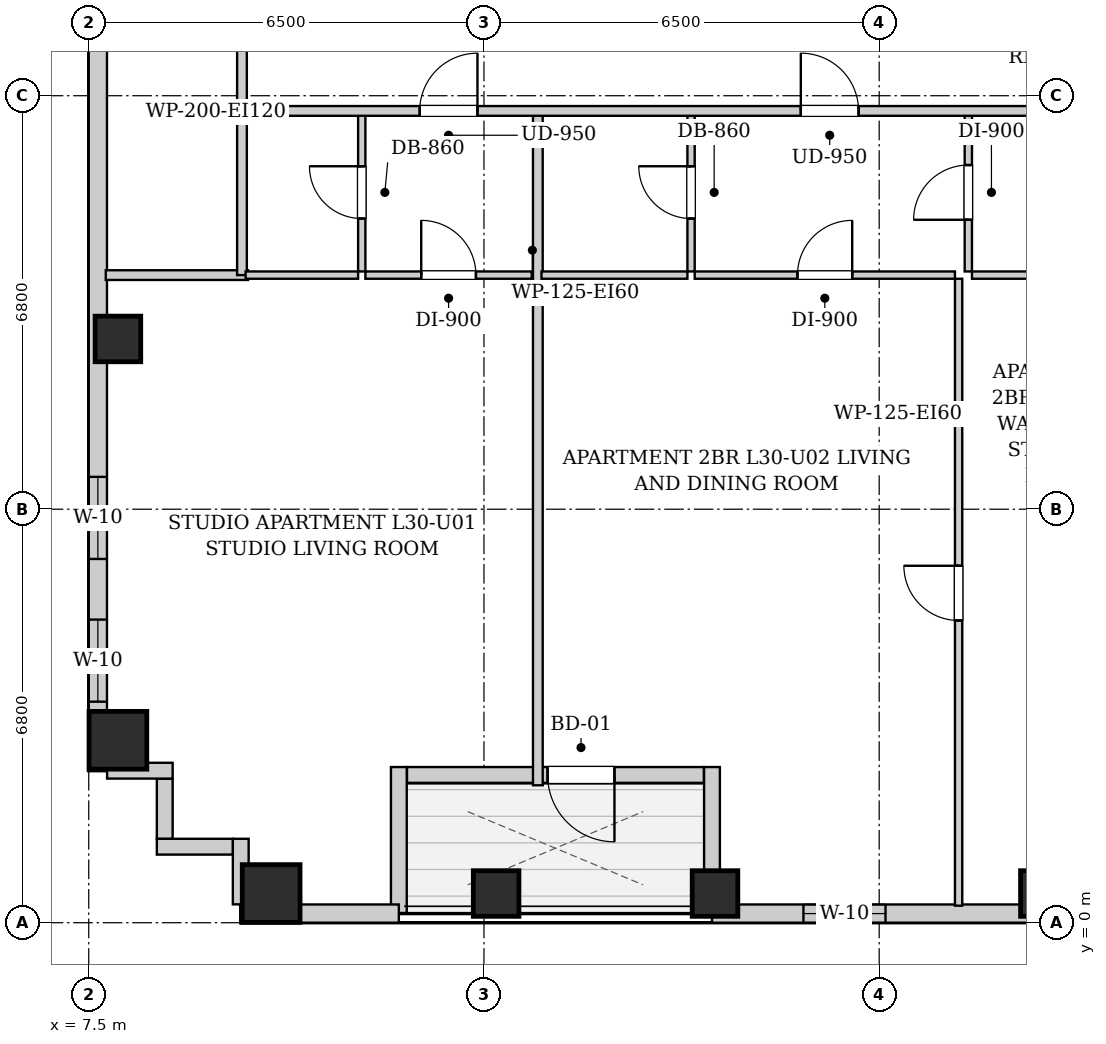
"""IFC4 building model, lengths in metres.
Left out: names, types, materials, properties, quantities, classifications, styles, units other than length and angle.
Written with IfcOpenShell. Run it as: python <this file> out.ifc"""

import sys

from ifc_helpers import new_model, si_unit, direction, frame, frame_2d, origin, origin_2d, place, context, subcontext, project, spatial, rectangle, extrude, element, fill, save


model = new_model("IFC4")
c1 = context("Model", 3, precision=1e-05, world=origin(), true_north=direction((0.0, 1.0)))
c2 = subcontext(c1, "Body", "Model", "MODEL_VIEW")
j1 = project(units=[si_unit("LENGTHUNIT", "METRE"), si_unit("PLANEANGLEUNIT", "RADIAN")], contexts=[c1])
p1 = place(None, origin())
s1 = spatial("IfcSite", under=j1, at=p1, CompositionType="ELEMENT")
p2 = place(p1, origin())
s2 = spatial("IfcBuilding", under=s1, at=p2, CompositionType="ELEMENT")
p3 = place(p2, frame((0.0, 0.0, 107.1)))
s3 = spatial("IfcBuildingStorey", under=s2, at=p3, CompositionType="ELEMENT", Elevation=107.1)
p4 = place(p3, frame((10.5, 0.48, 0.0), z_axis=(0.0, 0.0, 1.0), x_axis=(1.0, 0.0, 0.0)))
e1 = element("IfcColumn", 1, at=p4, inside=s3, PredefinedType="COLUMN", context=c2, shape_type="SweptSolid", body=[
    extrude(rectangle(XDim=0.95, YDim=0.95, at=origin_2d()), origin(), (0.0, 0.0, 1.0), 3.2),
])
for number, where, z_axis, x_axis in (
    (2, (14.2, 0.48, 0.0), (0.0, 0.0, 1.0), (1.0, 0.0, 0.0)),
    (3, (17.8, 0.48, 0.0), (0.0, 0.0, 1.0), (1.0, 0.0, 0.0)),
    (4, (23.2, 0.48, 0.0), (0.0, 0.0, 1.0), (1.0, 0.0, 0.0)),
):
    element("IfcColumn", number, at=place(p3, frame(where, z_axis=z_axis, x_axis=x_axis)), inside=s3, PredefinedType="COLUMN", context=c2, shape_type="SweptSolid", body=[
        extrude(rectangle(XDim=0.75, YDim=0.75, at=origin_2d()), origin(), (0.0, 0.0, 1.0), 3.2),
    ])
p5 = place(p3, frame((7.98, 3.0, 0.0), z_axis=(0.0, 0.0, 1.0), x_axis=(1.0, 0.0, 0.0)))
e5 = element("IfcColumn", 5, at=p5, inside=s3, PredefinedType="COLUMN", context=c2, shape_type="SweptSolid", body=[
    extrude(rectangle(XDim=0.95, YDim=0.95, at=origin_2d()), origin(), (0.0, 0.0, 1.0), 3.2),
])
p6 = place(p3, frame((7.98, 9.6, 0.0), z_axis=(0.0, 0.0, 1.0), x_axis=(1.0, 0.0, 0.0)))
e6 = element("IfcColumn", 6, at=p6, inside=s3, PredefinedType="COLUMN", context=c2, shape_type="SweptSolid", body=[
    extrude(rectangle(XDim=0.75, YDim=0.75, at=origin_2d()), origin(), (0.0, 0.0, 1.0), 3.2),
])
p7 = place(p3, frame((40.9, 0.15, 0.0), z_axis=(0.0, 0.0, 1.0), x_axis=(-1.0, 0.0, 0.0)))
e7 = element("IfcWall", 7, at=p7, inside=s3, PredefinedType="SOLIDWALL", context=c2, shape_type="SweptSolid", body=[
    extrude(rectangle(XDim=23.15, YDim=0.3, at=frame_2d((11.575, 0.0))), origin(), (0.0, 0.0, 1.0), 2.94),
])
p8 = place(p7, frame((20.296, 0.0, 0.55)))
e8 = element("IfcOpeningElement", 8, at=p8, cuts=e7, PredefinedType="OPENING", context=c2, shape_type="SweptSolid", body=[
    extrude(rectangle(XDim=1.35, YDim=1.2, at=frame_2d((0.675, 0.6))), frame((0.0, 0.16, 0.0), z_axis=(0.0, -1.0, 0.0), x_axis=(1.0, 0.0, 0.0)), (0.0, 0.0, 1.0), 0.32),
])
p9 = place(p7, frame((12.55, 0.0, 0.55)))
e9 = element("IfcOpeningElement", 9, at=p9, cuts=e7, PredefinedType="OPENING", context=c2, shape_type="SweptSolid", body=[
    extrude(rectangle(XDim=0.85, YDim=1.2, at=frame_2d((0.425, 0.6))), frame((0.0, 0.16, 0.0), z_axis=(0.0, -1.0, 0.0), x_axis=(1.0, 0.0, 0.0)), (0.0, 0.0, 1.0), 0.32),
])
p10 = place(p7, frame((9.622, 0.0, 0.55)))
e10 = element("IfcOpeningElement", 10, at=p10, cuts=e7, PredefinedType="OPENING", context=c2, shape_type="SweptSolid", body=[
    extrude(rectangle(XDim=1.35, YDim=1.2, at=frame_2d((0.675, 0.6))), frame((0.0, 0.16, 0.0), z_axis=(0.0, -1.0, 0.0), x_axis=(1.0, 0.0, 0.0)), (0.0, 0.0, 1.0), 0.32),
])
p11 = place(p7, frame((5.815, 0.0, 0.55)))
e11 = element("IfcOpeningElement", 11, at=p11, cuts=e7, PredefinedType="OPENING", context=c2, shape_type="SweptSolid", body=[
    extrude(rectangle(XDim=1.35, YDim=1.2, at=frame_2d((0.675, 0.6))), frame((0.0, 0.16, 0.0), z_axis=(0.0, -1.0, 0.0), x_axis=(1.0, 0.0, 0.0)), (0.0, 0.0, 1.0), 0.32),
])
p12 = place(p7, frame((2.106, 0.0, 0.55)))
e12 = element("IfcOpeningElement", 12, at=p12, cuts=e7, PredefinedType="OPENING", context=c2, shape_type="SweptSolid", body=[
    extrude(rectangle(XDim=1.35, YDim=1.2, at=frame_2d((0.675, 0.6))), frame((0.0, 0.16, 0.0), z_axis=(0.0, -1.0, 0.0), x_axis=(1.0, 0.0, 0.0)), (0.0, 0.0, 1.0), 0.32),
])
p13 = place(p3, frame((17.75, 0.16, 0.0), z_axis=(0.0, 0.0, 1.0), x_axis=(0.0, 1.0, 0.0)))
e13 = element("IfcWall", 13, at=p13, inside=s3, PredefinedType="SOLIDWALL", context=c2, shape_type="SweptSolid", body=[
    extrude(rectangle(XDim=2.4, YDim=0.26, at=frame_2d((1.2, 0.0))), origin(), (0.0, 0.0, 1.0), 2.313),
])
p14 = place(p3, frame((17.616, 2.43, 0.0), z_axis=(0.0, 0.0, 1.0), x_axis=(-1.0, 0.0, 0.0)))
e14 = element("IfcWall", 14, at=p14, inside=s3, PredefinedType="SOLIDWALL", context=c2, shape_type="SweptSolid", body=[
    extrude(rectangle(XDim=4.882, YDim=0.26, at=frame_2d((2.441, 0.0))), origin(), (0.0, 0.0, 1.0), 2.94),
])
p15 = place(p14, frame((1.47, 0.0, 0.0)))
e15 = element("IfcOpeningElement", 15, at=p15, cuts=e14, PredefinedType="OPENING", context=c2, shape_type="SweptSolid", body=[
    extrude(rectangle(XDim=1.1, YDim=2.0, at=frame_2d((0.55, 1.0))), frame((0.0, 0.14, 0.0), z_axis=(0.0, -1.0, 0.0), x_axis=(1.0, 0.0, 0.0)), (0.0, 0.0, 1.0), 0.28),
])
p16 = place(p3, frame((12.6, 2.56, 0.0), z_axis=(0.0, 0.0, 1.0), x_axis=(0.0, -1.0, 0.0)))
e16 = element("IfcWall", 16, at=p16, inside=s3, PredefinedType="SOLIDWALL", context=c2, shape_type="SweptSolid", body=[
    extrude(rectangle(XDim=2.4, YDim=0.26, at=frame_2d((1.2, 0.0))), origin(), (0.0, 0.0, 1.0), 2.94),
])
p17 = place(p3, frame((12.6, 0.15, 0.0), z_axis=(0.0, 0.0, 1.0), x_axis=(-1.0, 0.0, 0.0)))
e17 = element("IfcWall", 17, at=p17, inside=s3, PredefinedType="SOLIDWALL", context=c2, shape_type="SweptSolid", body=[
    extrude(rectangle(XDim=2.6, YDim=0.3, at=frame_2d((1.3, 0.0))), origin(), (0.0, 0.0, 1.0), 2.94),
])
p18 = place(p3, frame((7.65, 2.5, 0.0), z_axis=(0.0, 0.0, 1.0), x_axis=(0.0, 1.0, 0.0)))
e18 = element("IfcWall", 18, at=p18, inside=s3, PredefinedType="SOLIDWALL", context=c2, shape_type="SweptSolid", body=[
    extrude(rectangle(XDim=12.7, YDim=0.3, at=frame_2d((6.35, 0.0))), origin(), (0.0, 0.0, 1.0), 2.94),
])
p19 = place(p18, frame((3.482, 0.0, 0.55)))
e19 = element("IfcOpeningElement", 19, at=p19, cuts=e18, PredefinedType="OPENING", context=c2, shape_type="SweptSolid", body=[
    extrude(rectangle(XDim=1.35, YDim=1.2, at=frame_2d((0.675, 0.6))), frame((0.0, 0.16, 0.0), z_axis=(0.0, -1.0, 0.0), x_axis=(1.0, 0.0, 0.0)), (0.0, 0.0, 1.0), 0.32),
])
p20 = place(p18, frame((1.135, 0.0, 0.55)))
e20 = element("IfcOpeningElement", 20, at=p20, cuts=e18, PredefinedType="OPENING", context=c2, shape_type="SweptSolid", body=[
    extrude(rectangle(XDim=1.35, YDim=1.2, at=frame_2d((0.675, 0.6))), frame((0.0, 0.16, 0.0), z_axis=(0.0, -1.0, 0.0), x_axis=(1.0, 0.0, 0.0)), (0.0, 0.0, 1.0), 0.32),
])
p21 = place(p3, frame((10.0, 0.302, 0.0), z_axis=(0.0, 0.0, 1.0), x_axis=(0.0, 1.0, 0.0)))
e21 = element("IfcWall", 21, at=p21, inside=s3, PredefinedType="SOLIDWALL", context=c2, shape_type="SweptSolid", body=[
    extrude(rectangle(XDim=1.078, YDim=0.26, at=frame_2d((0.539, 0.0))), origin(), (0.0, 0.0, 1.0), 2.94),
])
p22 = place(p3, frame((9.868, 1.25, 0.0), z_axis=(0.0, 0.0, 1.0), x_axis=(-1.0, 0.0, 0.0)))
e22 = element("IfcWall", 22, at=p22, inside=s3, PredefinedType="SOLIDWALL", context=c2, shape_type="SweptSolid", body=[
    extrude(rectangle(XDim=1.248, YDim=0.26, at=frame_2d((0.624, 0.0))), origin(), (0.0, 0.0, 1.0), 2.94),
])
p23 = place(p3, frame((8.75, 1.382, 0.0), z_axis=(0.0, 0.0, 1.0), x_axis=(0.0, 1.0, 0.0)))
e23 = element("IfcWall", 23, at=p23, inside=s3, PredefinedType="SOLIDWALL", context=c2, shape_type="SweptSolid", body=[
    extrude(rectangle(XDim=0.986, YDim=0.26, at=frame_2d((0.493, 0.0))), origin(), (0.0, 0.0, 1.0), 2.94),
])
p24 = place(p3, frame((8.88, 2.5, 0.0), z_axis=(0.0, 0.0, 1.0), x_axis=(-1.0, 0.0, 0.0)))
e24 = element("IfcWall", 24, at=p24, inside=s3, PredefinedType="SOLIDWALL", context=c2, shape_type="SweptSolid", body=[
    extrude(rectangle(XDim=1.078, YDim=0.26, at=frame_2d((0.539, 0.0))), origin(), (0.0, 0.0, 1.0), 2.94),
])
p25 = place(p3, frame((10.02, 13.35, 0.0), z_axis=(0.0, 0.0, 1.0), x_axis=(0.0, 1.0, 0.0)))
e25 = element("IfcWall", 25, at=p25, inside=s3, PredefinedType="PARTITIONING", context=c2, shape_type="SweptSolid", body=[
    extrude(rectangle(XDim=1.74, YDim=0.16, at=frame_2d((0.87, 0.0))), origin(), (0.0, 0.0, 1.0), 2.94),
])
p26 = place(p3, frame((7.78, 10.65, 0.0), z_axis=(0.0, 0.0, 1.0), x_axis=(1.0, 0.0, 0.0)))
e26 = element("IfcWall", 26, at=p26, inside=s3, PredefinedType="PARTITIONING", context=c2, shape_type="SweptSolid", body=[
    extrude(rectangle(XDim=2.34, YDim=0.16, at=frame_2d((1.17, 0.0))), origin(), (0.0, 0.0, 1.0), 2.94),
])
p27 = place(p3, frame((10.02, 10.65, 0.0), z_axis=(0.0, 0.0, 1.0), x_axis=(0.0, 1.0, 0.0)))
e27 = element("IfcWall", 27, at=p27, inside=s3, PredefinedType="PARTITIONING", context=c2, shape_type="SweptSolid", body=[
    extrude(rectangle(XDim=2.66, YDim=0.16, at=frame_2d((1.33, 0.0))), origin(), (0.0, 0.0, 1.0), 2.94),
])
p28 = place(p3, frame((11.99, 10.71, 0.0), z_axis=(0.0, 0.0, 1.0), x_axis=(0.0, 1.0, 0.0)))
e28 = element("IfcWall", 28, at=p28, inside=s3, PredefinedType="PARTITIONING", context=c2, shape_type="SweptSolid", body=[
    extrude(rectangle(XDim=2.6, YDim=0.12, at=frame_2d((1.3, 0.0))), origin(), (0.0, 0.0, 1.0), 2.94),
])
p29 = place(p28, frame((0.87, 0.0, 0.0)))
e29 = element("IfcOpeningElement", 29, at=p29, cuts=e28, PredefinedType="OPENING", context=c2, shape_type="SweptSolid", body=[
    extrude(rectangle(XDim=0.86, YDim=2.05, at=frame_2d((0.43, 1.025))), frame((0.0, 0.07, 0.0), z_axis=(0.0, -1.0, 0.0), x_axis=(1.0, 0.0, 0.0)), (0.0, 0.0, 1.0), 0.14),
])
p30 = place(p3, frame((10.08, 10.65, 0.0), z_axis=(0.0, 0.0, 1.0), x_axis=(1.0, 0.0, 0.0)))
e30 = element("IfcWall", 30, at=p30, inside=s3, PredefinedType="PARTITIONING", context=c2, shape_type="SweptSolid", body=[
    extrude(rectangle(XDim=1.85, YDim=0.12, at=frame_2d((0.925, 0.0))), origin(), (0.0, 0.0, 1.0), 2.94),
])
p31 = place(p3, frame((12.05, 10.65, 0.0), z_axis=(0.0, 0.0, 1.0), x_axis=(1.0, 0.0, 0.0)))
e31 = element("IfcWall", 31, at=p31, inside=s3, PredefinedType="PARTITIONING", context=c2, shape_type="SweptSolid", body=[
    extrude(rectangle(XDim=2.736, YDim=0.12, at=frame_2d((1.368, 0.0))), origin(), (0.0, 0.0, 1.0), 2.94),
])
p32 = place(p31, frame((0.918, 0.0, 0.0)))
e32 = element("IfcOpeningElement", 32, at=p32, cuts=e31, PredefinedType="OPENING", context=c2, shape_type="SweptSolid", body=[
    extrude(rectangle(XDim=0.9, YDim=2.05, at=frame_2d((0.45, 1.025))), frame((0.0, 0.07, 0.0), z_axis=(0.0, -1.0, 0.0), x_axis=(1.0, 0.0, 0.0)), (0.0, 0.0, 1.0), 0.14),
])
p33 = place(p3, frame((14.886, 2.26, 0.0), z_axis=(0.0, 0.0, 1.0), x_axis=(0.0, 1.0, 0.0)))
e33 = element("IfcWall", 33, at=p33, inside=s3, PredefinedType="PARTITIONING", context=c2, shape_type="SweptSolid", body=[
    extrude(rectangle(XDim=11.05, YDim=0.16, at=frame_2d((5.525, 0.0))), origin(), (0.0, 0.0, 1.0), 2.94),
])
p34 = place(p3, frame((17.406, 10.71, 0.0), z_axis=(0.0, 0.0, 1.0), x_axis=(0.0, 1.0, 0.0)))
e34 = element("IfcWall", 34, at=p34, inside=s3, PredefinedType="PARTITIONING", context=c2, shape_type="SweptSolid", body=[
    extrude(rectangle(XDim=2.6, YDim=0.12, at=frame_2d((1.3, 0.0))), origin(), (0.0, 0.0, 1.0), 2.94),
])
p35 = place(p34, frame((0.87, 0.0, 0.0)))
e35 = element("IfcOpeningElement", 35, at=p35, cuts=e34, PredefinedType="OPENING", context=c2, shape_type="SweptSolid", body=[
    extrude(rectangle(XDim=0.86, YDim=2.05, at=frame_2d((0.43, 1.025))), frame((0.0, 0.07, 0.0), z_axis=(0.0, -1.0, 0.0), x_axis=(1.0, 0.0, 0.0)), (0.0, 0.0, 1.0), 0.14),
])
p36 = place(p3, frame((14.946, 10.65, 0.0), z_axis=(0.0, 0.0, 1.0), x_axis=(1.0, 0.0, 0.0)))
e36 = element("IfcWall", 36, at=p36, inside=s3, PredefinedType="PARTITIONING", context=c2, shape_type="SweptSolid", body=[
    extrude(rectangle(XDim=2.4, YDim=0.12, at=frame_2d((1.2, 0.0))), origin(), (0.0, 0.0, 1.0), 2.94),
])
p37 = place(p3, frame((21.966, 10.71, 0.0), z_axis=(0.0, 0.0, 1.0), x_axis=(0.0, 1.0, 0.0)))
e37 = element("IfcWall", 37, at=p37, inside=s3, PredefinedType="PARTITIONING", context=c2, shape_type="SweptSolid", body=[
    extrude(rectangle(XDim=2.6, YDim=0.12, at=frame_2d((1.3, 0.0))), origin(), (0.0, 0.0, 1.0), 2.94),
])
p38 = place(p37, frame((0.85, 0.0, 0.0)))
e38 = element("IfcOpeningElement", 38, at=p38, cuts=e37, PredefinedType="OPENING", context=c2, shape_type="SweptSolid", body=[
    extrude(rectangle(XDim=0.9, YDim=2.05, at=frame_2d((0.45, 1.025))), frame((0.0, 0.07, 0.0), z_axis=(0.0, -1.0, 0.0), x_axis=(1.0, 0.0, 0.0)), (0.0, 0.0, 1.0), 0.14),
])
p39 = place(p3, frame((17.466, 10.65, 0.0), z_axis=(0.0, 0.0, 1.0), x_axis=(1.0, 0.0, 0.0)))
e39 = element("IfcWall", 39, at=p39, inside=s3, PredefinedType="PARTITIONING", context=c2, shape_type="SweptSolid", body=[
    extrude(rectangle(XDim=4.28, YDim=0.12, at=frame_2d((2.14, 0.0))), origin(), (0.0, 0.0, 1.0), 2.94),
])
p40 = place(p39, frame((1.69, 0.0, 0.0)))
e40 = element("IfcOpeningElement", 40, at=p40, cuts=e39, PredefinedType="OPENING", context=c2, shape_type="SweptSolid", body=[
    extrude(rectangle(XDim=0.9, YDim=2.05, at=frame_2d((0.45, 1.025))), frame((0.0, 0.07, 0.0), z_axis=(0.0, -1.0, 0.0), x_axis=(1.0, 0.0, 0.0)), (0.0, 0.0, 1.0), 0.14),
])
p41 = place(p3, frame((22.026, 10.65, 0.0), z_axis=(0.0, 0.0, 1.0), x_axis=(1.0, 0.0, 0.0)))
e41 = element("IfcWall", 41, at=p41, inside=s3, PredefinedType="PARTITIONING", context=c2, shape_type="SweptSolid", body=[
    extrude(rectangle(XDim=2.905, YDim=0.12, at=frame_2d((1.453, 0.0))), origin(), (0.0, 0.0, 1.0), 2.94),
])
p42 = place(p41, frame((1.003, 0.0, 0.0)))
e42 = element("IfcOpeningElement", 42, at=p42, cuts=e41, PredefinedType="OPENING", context=c2, shape_type="SweptSolid", body=[
    extrude(rectangle(XDim=0.9, YDim=2.05, at=frame_2d((0.45, 1.025))), frame((0.0, 0.07, 0.0), z_axis=(0.0, -1.0, 0.0), x_axis=(1.0, 0.0, 0.0)), (0.0, 0.0, 1.0), 0.14),
])
p43 = place(p3, frame((21.806, 0.28, 0.0), z_axis=(0.0, 0.0, 1.0), x_axis=(0.0, 1.0, 0.0)))
e43 = element("IfcWall", 43, at=p43, inside=s3, PredefinedType="PARTITIONING", context=c2, shape_type="SweptSolid", body=[
    extrude(rectangle(XDim=10.31, YDim=0.12, at=frame_2d((5.155, 0.0))), origin(), (0.0, 0.0, 1.0), 2.94),
])
p44 = place(p43, frame((4.69, 0.0, 0.0)))
e44 = element("IfcOpeningElement", 44, at=p44, cuts=e43, PredefinedType="OPENING", context=c2, shape_type="SweptSolid", body=[
    extrude(rectangle(XDim=0.9, YDim=2.05, at=frame_2d((0.45, 1.025))), frame((0.0, 0.07, 0.0), z_axis=(0.0, -1.0, 0.0), x_axis=(1.0, 0.0, 0.0)), (0.0, 0.0, 1.0), 0.14),
])
p45 = place(p3, frame((10.05, 13.35, 0.0), z_axis=(0.0, 0.0, 1.0), x_axis=(1.0, 0.0, 0.0)))
e45 = element("IfcWall", 45, at=p45, inside=s3, PredefinedType="PARTITIONING", context=c2, shape_type="SweptSolid", body=[
    extrude(rectangle(XDim=30.8, YDim=0.16, at=frame_2d((15.4, 0.0))), origin(), (0.0, 0.0, 1.0), 2.94),
])
p46 = place(p45, frame((2.893, 0.0, 0.0)))
e46 = element("IfcOpeningElement", 46, at=p46, cuts=e45, PredefinedType="OPENING", context=c2, shape_type="SweptSolid", body=[
    extrude(rectangle(XDim=0.95, YDim=2.1, at=frame_2d((0.475, 1.05))), frame((0.0, 0.09, 0.0), z_axis=(0.0, -1.0, 0.0), x_axis=(1.0, 0.0, 0.0)), (0.0, 0.0, 1.0), 0.18),
])
p47 = place(p45, frame((9.161, 0.0, 0.0)))
e47 = element("IfcOpeningElement", 47, at=p47, cuts=e45, PredefinedType="OPENING", context=c2, shape_type="SweptSolid", body=[
    extrude(rectangle(XDim=0.95, YDim=2.1, at=frame_2d((0.475, 1.05))), frame((0.0, 0.09, 0.0), z_axis=(0.0, -1.0, 0.0), x_axis=(1.0, 0.0, 0.0)), (0.0, 0.0, 1.0), 0.18),
])
p48 = place(p45, frame((26.306, 0.0, 0.0)))
e48 = element("IfcOpeningElement", 48, at=p48, cuts=e45, PredefinedType="OPENING", context=c2, shape_type="SweptSolid", body=[
    extrude(rectangle(XDim=0.95, YDim=2.1, at=frame_2d((0.475, 1.05))), frame((0.0, 0.09, 0.0), z_axis=(0.0, -1.0, 0.0), x_axis=(1.0, 0.0, 0.0)), (0.0, 0.0, 1.0), 0.18),
])
p49 = place(p29, origin())
e49 = element("IfcDoor", 49, at=p49, inside=s3, OperationType="SINGLE_SWING_RIGHT", PredefinedType="DOOR", context=c2, shape_type="SweptSolid", body=[
    extrude(rectangle(XDim=0.86, YDim=2.05, at=frame_2d((0.43, 1.025))), frame((0.0, 0.025, 0.0), z_axis=(0.0, -1.0, 0.0), x_axis=(1.0, 0.0, 0.0)), (0.0, 0.0, 1.0), 0.05),
])
fill(e29, e49)
p50 = place(p32, origin())
e50 = element("IfcDoor", 50, at=p50, inside=s3, OperationType="SINGLE_SWING_LEFT", PredefinedType="DOOR", context=c2, shape_type="SweptSolid", body=[
    extrude(rectangle(XDim=0.9, YDim=2.05, at=frame_2d((0.45, 1.025))), frame((0.0, 0.025, 0.0), z_axis=(0.0, -1.0, 0.0), x_axis=(1.0, 0.0, 0.0)), (0.0, 0.0, 1.0), 0.05),
])
fill(e32, e50)
p51 = place(p35, origin())
e51 = element("IfcDoor", 51, at=p51, inside=s3, OperationType="SINGLE_SWING_RIGHT", PredefinedType="DOOR", context=c2, shape_type="SweptSolid", body=[
    extrude(rectangle(XDim=0.86, YDim=2.05, at=frame_2d((0.43, 1.025))), frame((0.0, 0.025, 0.0), z_axis=(0.0, -1.0, 0.0), x_axis=(1.0, 0.0, 0.0)), (0.0, 0.0, 1.0), 0.05),
])
fill(e35, e51)
p52 = place(p38, origin())
e52 = element("IfcDoor", 52, at=p52, inside=s3, OperationType="SINGLE_SWING_LEFT", PredefinedType="DOOR", context=c2, shape_type="SweptSolid", body=[
    extrude(rectangle(XDim=0.9, YDim=2.05, at=frame_2d((0.45, 1.025))), frame((0.0, 0.025, 0.0), z_axis=(0.0, -1.0, 0.0), x_axis=(1.0, 0.0, 0.0)), (0.0, 0.0, 1.0), 0.05),
])
fill(e38, e52)
p53 = place(p40, origin())
e53 = element("IfcDoor", 53, at=p53, inside=s3, OperationType="SINGLE_SWING_RIGHT", PredefinedType="DOOR", context=c2, shape_type="SweptSolid", body=[
    extrude(rectangle(XDim=0.9, YDim=2.05, at=frame_2d((0.45, 1.025))), frame((0.0, 0.025, 0.0), z_axis=(0.0, -1.0, 0.0), x_axis=(1.0, 0.0, 0.0)), (0.0, 0.0, 1.0), 0.05),
])
fill(e40, e53)
p54 = place(p44, origin())
e54 = element("IfcDoor", 54, at=p54, inside=s3, OperationType="SINGLE_SWING_RIGHT", PredefinedType="DOOR", context=c2, shape_type="SweptSolid", body=[
    extrude(rectangle(XDim=0.9, YDim=2.05, at=frame_2d((0.45, 1.025))), frame((0.0, 0.025, 0.0), z_axis=(0.0, -1.0, 0.0), x_axis=(1.0, 0.0, 0.0)), (0.0, 0.0, 1.0), 0.05),
])
fill(e44, e54)
p55 = place(p46, origin())
e55 = element("IfcDoor", 55, at=p55, inside=s3, OperationType="SINGLE_SWING_RIGHT", PredefinedType="DOOR", context=c2, shape_type="SweptSolid", body=[
    extrude(rectangle(XDim=0.95, YDim=2.1, at=frame_2d((0.475, 1.05))), frame((0.0, 0.025, 0.0), z_axis=(0.0, -1.0, 0.0), x_axis=(1.0, 0.0, 0.0)), (0.0, 0.0, 1.0), 0.05),
])
fill(e46, e55)
p56 = place(p47, origin())
e56 = element("IfcDoor", 56, at=p56, inside=s3, OperationType="SINGLE_SWING_LEFT", PredefinedType="DOOR", context=c2, shape_type="SweptSolid", body=[
    extrude(rectangle(XDim=0.95, YDim=2.1, at=frame_2d((0.475, 1.05))), frame((0.0, 0.025, 0.0), z_axis=(0.0, -1.0, 0.0), x_axis=(1.0, 0.0, 0.0)), (0.0, 0.0, 1.0), 0.05),
])
fill(e47, e56)
p57 = place(p15, origin())
e57 = element("IfcDoor", 57, at=p57, inside=s3, OperationType="SINGLE_SWING_LEFT", PredefinedType="DOOR", context=c2, shape_type="SweptSolid", body=[
    extrude(rectangle(XDim=1.1, YDim=2.0, at=frame_2d((0.55, 1.0))), frame((0.0, 0.025, 0.0), z_axis=(0.0, -1.0, 0.0), x_axis=(1.0, 0.0, 0.0)), (0.0, 0.0, 1.0), 0.05),
])
fill(e15, e57)
p58 = place(p19, origin())
e58 = element("IfcWindow", 58, at=p58, inside=s3, PartitioningType="SINGLE_PANEL", PredefinedType="WINDOW", context=c2, shape_type="SweptSolid", body=[
    extrude(rectangle(XDim=1.35, YDim=1.2, at=frame_2d((0.675, 0.6))), frame((0.0, 0.03, 0.0), z_axis=(0.0, -1.0, 0.0), x_axis=(1.0, 0.0, 0.0)), (0.0, 0.0, 1.0), 0.06),
])
fill(e19, e58)
p59 = place(p20, origin())
e59 = element("IfcWindow", 59, at=p59, inside=s3, PartitioningType="SINGLE_PANEL", PredefinedType="WINDOW", context=c2, shape_type="SweptSolid", body=[
    extrude(rectangle(XDim=1.35, YDim=1.2, at=frame_2d((0.675, 0.6))), frame((0.0, 0.03, 0.0), z_axis=(0.0, -1.0, 0.0), x_axis=(1.0, 0.0, 0.0)), (0.0, 0.0, 1.0), 0.06),
])
fill(e20, e59)
p60 = place(p8, origin())
e60 = element("IfcWindow", 60, at=p60, inside=s3, PartitioningType="SINGLE_PANEL", PredefinedType="WINDOW", context=c2, shape_type="SweptSolid", body=[
    extrude(rectangle(XDim=1.35, YDim=1.2, at=frame_2d((0.675, 0.6))), frame((0.0, 0.03, 0.0), z_axis=(0.0, -1.0, 0.0), x_axis=(1.0, 0.0, 0.0)), (0.0, 0.0, 1.0), 0.06),
])
fill(e8, e60)
save(model, sys.argv[1])
